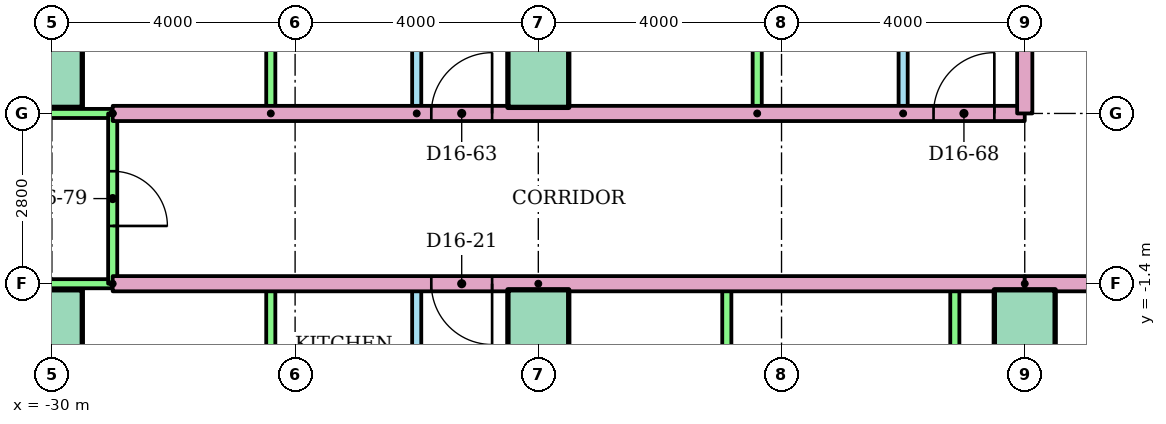
"""IFC4 building model, lengths in metres.
Left out: names, types, materials, properties, quantities, classifications, styles, units other than length and angle.
Written with IfcOpenShell. Run it as: python <this file> out.ifc"""

import sys

from ifc_helpers import new_model, si_unit, direction, frame, frame_2d, origin, origin_2d, place, context, subcontext, project, spatial, rectangle, extrude, element, fill, save


model = new_model("IFC4")
c1 = context("Model", 3, precision=1e-05, world=origin(), true_north=direction((0.0, 1.0)))
c2 = subcontext(c1, "Body", "Model", "MODEL_VIEW")
j1 = project(units=[si_unit("LENGTHUNIT", "METRE"), si_unit("PLANEANGLEUNIT", "RADIAN")], contexts=[c1])
p1 = place(None, origin())
s1 = spatial("IfcSite", under=j1, at=p1, CompositionType="ELEMENT")
p2 = place(p1, origin())
s2 = spatial("IfcBuilding", under=s1, at=p2, CompositionType="ELEMENT")
p3 = place(p2, frame((0.0, 0.0, 60.8)))
s3 = spatial("IfcBuildingStorey", under=s2, at=p3, CompositionType="ELEMENT", Elevation=60.8)
for number, where in (
    (1, (-30.0, -2.0, 0.0)),
    (2, (-22.0, -2.0, 0.0)),
    (3, (-14.0, -2.0, 0.0)),
    (4, (-30.0, 2.0, 0.0)),
    (5, (-22.0, 2.0, 0.0)),
):
    element("IfcColumn", number, at=place(p3, frame(where)), inside=s3, PredefinedType="COLUMN", context=c2, shape_type="SweptSolid", body=[
        extrude(rectangle(XDim=1.0, YDim=1.0, at=origin_2d()), origin(), (0.0, 0.0, 1.0), 3.2),
    ])
p4 = place(p3, frame((-24.0, -6.6, 0.0), z_axis=(0.0, 0.0, 1.0), x_axis=(0.0, 1.0, 0.0)))
e6 = element("IfcWall", 6, at=p4, inside=s3, PredefinedType="PARTITIONING", context=c2, shape_type="SweptSolid", body=[
    extrude(rectangle(XDim=5.2, YDim=0.15, at=frame_2d((2.6, 0.0))), origin(), (0.0, 0.0, 1.0), 2.4),
])
p5 = place(p4, frame((2.94, 0.0, 0.0)))
e7 = element("IfcOpeningElement", 7, at=p5, cuts=e6, PredefinedType="OPENING", context=c2, shape_type="SweptSolid", body=[
    extrude(rectangle(XDim=0.9, YDim=2.1, at=frame_2d((0.45, 1.05))), frame((0.0, 0.085, 0.0), z_axis=(0.0, -1.0, 0.0), x_axis=(1.0, 0.0, 0.0)), (0.0, 0.0, 1.0), 0.17),
])
p6 = place(p4, frame((0.825, 0.0, 0.0)))
e8 = element("IfcOpeningElement", 8, at=p6, cuts=e6, PredefinedType="OPENING", context=c2, shape_type="SweptSolid", body=[
    extrude(rectangle(XDim=0.8, YDim=2.1, at=frame_2d((0.4, 1.05))), frame((0.0, 0.085, 0.0), z_axis=(0.0, -1.0, 0.0), x_axis=(1.0, 0.0, 0.0)), (0.0, 0.0, 1.0), 0.17),
])
for number, where, z_axis, x_axis in (
    (9, (-26.4, -6.6, 0.0), (0.0, 0.0, 1.0), (0.0, 1.0, 0.0)),
    (10, (-15.15, -6.6, 0.0), (0.0, 0.0, 1.0), (0.0, 1.0, 0.0)),
    (11, (-18.9, -6.6, 0.0), (0.0, 0.0, 1.0), (0.0, 1.0, 0.0)),
):
    element("IfcWall", number, at=place(p3, frame(where, z_axis=z_axis, x_axis=x_axis)), inside=s3, PredefinedType="PARTITIONING", context=c2, shape_type="SweptSolid", body=[
        extrude(rectangle(XDim=5.2, YDim=0.15, at=frame_2d((2.6, 0.0))), origin(), (0.0, 0.0, 1.0), 2.4),
    ])
p7 = place(p3, frame((-22.0, -1.4, 0.0), z_axis=(0.0, 0.0, 1.0), x_axis=(0.0, -1.0, 0.0)))
e12 = element("IfcWall", 12, at=p7, inside=s3, PredefinedType="PARTITIONING", context=c2, shape_type="SweptSolid", body=[
    extrude(rectangle(XDim=14.71, YDim=0.25, at=frame_2d((7.355, 0.0))), origin(), (0.0, 0.0, 1.0), 2.4),
])
p8 = place(p3, frame((-14.0, -1.4, 0.0), z_axis=(0.0, 0.0, 1.0), x_axis=(-1.0, 0.0, 0.0)))
e13 = element("IfcWall", 13, at=p8, inside=s3, PredefinedType="PARTITIONING", context=c2, shape_type="SweptSolid", body=[
    extrude(rectangle(XDim=15.0, YDim=0.25, at=frame_2d((7.5, 0.0))), origin(), (0.0, 0.0, 1.0), 2.4),
])
p9 = place(p8, frame((8.76, 0.0, 0.0)))
e14 = element("IfcOpeningElement", 14, at=p9, cuts=e13, PredefinedType="OPENING", context=c2, shape_type="SweptSolid", body=[
    extrude(rectangle(XDim=1.0, YDim=2.1, at=frame_2d((0.5, 1.05))), frame((0.0, 0.135, 0.0), z_axis=(0.0, -1.0, 0.0), x_axis=(1.0, 0.0, 0.0)), (0.0, 0.0, 1.0), 0.27),
])
p10 = place(p3, frame((-29.0, -1.4, 0.0), z_axis=(0.0, 0.0, 1.0), x_axis=(-1.0, 0.0, 0.0)))
e15 = element("IfcWall", 15, at=p10, inside=s3, PredefinedType="PARTITIONING", context=c2, shape_type="SweptSolid", body=[
    extrude(rectangle(XDim=7.52, YDim=0.15, at=frame_2d((3.76, 0.0))), origin(), (0.0, 0.0, 1.0), 2.4),
])
p11 = place(p3, frame((-24.0, 1.4, 0.0), z_axis=(0.0, 0.0, 1.0), x_axis=(0.0, 1.0, 0.0)))
e16 = element("IfcWall", 16, at=p11, inside=s3, PredefinedType="PARTITIONING", context=c2, shape_type="SweptSolid", body=[
    extrude(rectangle(XDim=7.6, YDim=0.15, at=frame_2d((3.8, 0.0))), origin(), (0.0, 0.0, 1.0), 2.4),
])
p12 = place(p11, frame((1.675, 0.0, 0.0)))
e17 = element("IfcOpeningElement", 17, at=p12, cuts=e16, PredefinedType="OPENING", context=c2, shape_type="SweptSolid", body=[
    extrude(rectangle(XDim=0.9, YDim=2.1, at=frame_2d((0.45, 1.05))), frame((0.0, 0.085, 0.0), z_axis=(0.0, -1.0, 0.0), x_axis=(1.0, 0.0, 0.0)), (0.0, 0.0, 1.0), 0.17),
])
p13 = place(p11, frame((5.525, 0.0, 0.0)))
e18 = element("IfcOpeningElement", 18, at=p13, cuts=e16, PredefinedType="OPENING", context=c2, shape_type="SweptSolid", body=[
    extrude(rectangle(XDim=0.8, YDim=2.1, at=frame_2d((0.4, 1.05))), frame((0.0, 0.085, 0.0), z_axis=(0.0, -1.0, 0.0), x_axis=(1.0, 0.0, 0.0)), (0.0, 0.0, 1.0), 0.17),
])
p14 = place(p3, frame((-26.4, 1.4, 0.0), z_axis=(0.0, 0.0, 1.0), x_axis=(0.0, 1.0, 0.0)))
e19 = element("IfcWall", 19, at=p14, inside=s3, PredefinedType="PARTITIONING", context=c2, shape_type="SweptSolid", body=[
    extrude(rectangle(XDim=7.6, YDim=0.15, at=frame_2d((3.8, 0.0))), origin(), (0.0, 0.0, 1.0), 2.4),
])
p15 = place(p3, frame((-16.0, 1.4, 0.0), z_axis=(0.0, 0.0, 1.0), x_axis=(0.0, 1.0, 0.0)))
e20 = element("IfcWall", 20, at=p15, inside=s3, PredefinedType="PARTITIONING", context=c2, shape_type="SweptSolid", body=[
    extrude(rectangle(XDim=7.6, YDim=0.15, at=frame_2d((3.8, 0.0))), origin(), (0.0, 0.0, 1.0), 2.4),
])
p16 = place(p15, frame((1.675, 0.0, 0.0)))
e21 = element("IfcOpeningElement", 21, at=p16, cuts=e20, PredefinedType="OPENING", context=c2, shape_type="SweptSolid", body=[
    extrude(rectangle(XDim=0.9, YDim=2.1, at=frame_2d((0.45, 1.05))), frame((0.0, 0.085, 0.0), z_axis=(0.0, -1.0, 0.0), x_axis=(1.0, 0.0, 0.0)), (0.0, 0.0, 1.0), 0.17),
])
p17 = place(p15, frame((5.525, 0.0, 0.0)))
e22 = element("IfcOpeningElement", 22, at=p17, cuts=e20, PredefinedType="OPENING", context=c2, shape_type="SweptSolid", body=[
    extrude(rectangle(XDim=0.8, YDim=2.1, at=frame_2d((0.4, 1.05))), frame((0.0, 0.085, 0.0), z_axis=(0.0, -1.0, 0.0), x_axis=(1.0, 0.0, 0.0)), (0.0, 0.0, 1.0), 0.17),
])
p18 = place(p3, frame((-18.4, 1.4, 0.0), z_axis=(0.0, 0.0, 1.0), x_axis=(0.0, 1.0, 0.0)))
e23 = element("IfcWall", 23, at=p18, inside=s3, PredefinedType="PARTITIONING", context=c2, shape_type="SweptSolid", body=[
    extrude(rectangle(XDim=7.6, YDim=0.15, at=frame_2d((3.8, 0.0))), origin(), (0.0, 0.0, 1.0), 2.4),
])
p19 = place(p3, frame((-22.0, 18.521, 0.0), z_axis=(0.0, 0.0, 1.0), x_axis=(0.0, -1.0, 0.0)))
e24 = element("IfcWall", 24, at=p19, inside=s3, PredefinedType="PARTITIONING", context=c2, shape_type="SweptSolid", body=[
    extrude(rectangle(XDim=17.121, YDim=0.25, at=frame_2d((8.561, 0.0))), origin(), (0.0, 0.0, 1.0), 2.4),
])
p20 = place(p3, frame((-29.0, 1.4, 0.0)))
e25 = element("IfcWall", 25, at=p20, inside=s3, PredefinedType="PARTITIONING", context=c2, shape_type="SweptSolid", body=[
    extrude(rectangle(XDim=15.0, YDim=0.25, at=frame_2d((7.5, 0.0))), origin(), (0.0, 0.0, 1.0), 2.4),
])
p21 = place(p20, frame((5.24, 0.0, 0.0)))
e26 = element("IfcOpeningElement", 26, at=p21, cuts=e25, PredefinedType="OPENING", context=c2, shape_type="SweptSolid", body=[
    extrude(rectangle(XDim=1.0, YDim=2.1, at=frame_2d((0.5, 1.05))), frame((0.0, 0.135, 0.0), z_axis=(0.0, -1.0, 0.0), x_axis=(1.0, 0.0, 0.0)), (0.0, 0.0, 1.0), 0.27),
])
p22 = place(p20, frame((13.5, 0.0, 0.0)))
e27 = element("IfcOpeningElement", 27, at=p22, cuts=e25, PredefinedType="OPENING", context=c2, shape_type="SweptSolid", body=[
    extrude(rectangle(XDim=1.0, YDim=2.1, at=frame_2d((0.5, 1.05))), frame((0.0, 0.135, 0.0), z_axis=(0.0, -1.0, 0.0), x_axis=(1.0, 0.0, 0.0)), (0.0, 0.0, 1.0), 0.27),
])
p23 = place(p3, frame((-36.52, 1.4, 0.0)))
e28 = element("IfcWall", 28, at=p23, inside=s3, PredefinedType="PARTITIONING", context=c2, shape_type="SweptSolid", body=[
    extrude(rectangle(XDim=7.52, YDim=0.15, at=frame_2d((3.76, 0.0))), origin(), (0.0, 0.0, 1.0), 2.4),
])
p24 = place(p3, frame((-29.0, 1.4, 0.0), z_axis=(0.0, 0.0, 1.0), x_axis=(0.0, -1.0, 0.0)))
e29 = element("IfcWall", 29, at=p24, inside=s3, PredefinedType="PARTITIONING", context=c2, shape_type="SweptSolid", body=[
    extrude(rectangle(XDim=2.8, YDim=0.15, at=frame_2d((1.4, 0.0))), origin(), (0.0, 0.0, 1.0), 2.4),
])
p25 = place(p24, frame((0.95, 0.0, 0.0)))
e30 = element("IfcOpeningElement", 30, at=p25, cuts=e29, PredefinedType="OPENING", context=c2, shape_type="SweptSolid", body=[
    extrude(rectangle(XDim=0.9, YDim=2.1, at=frame_2d((0.45, 1.05))), frame((0.0, 0.085, 0.0), z_axis=(0.0, -1.0, 0.0), x_axis=(1.0, 0.0, 0.0)), (0.0, 0.0, 1.0), 0.17),
])
p26 = place(p3, frame((14.0, -1.4, 0.0), z_axis=(0.0, 0.0, 1.0), x_axis=(-1.0, 0.0, 0.0)))
e31 = element("IfcWall", 31, at=p26, inside=s3, PredefinedType="PARTITIONING", context=c2, shape_type="SweptSolid", body=[
    extrude(rectangle(XDim=28.0, YDim=0.25, at=frame_2d((14.0, 0.0))), origin(), (0.0, 0.0, 1.0), 2.4),
])
p27 = place(p26, frame((20.76, 0.0, 0.0)))
e32 = element("IfcOpeningElement", 32, at=p27, cuts=e31, PredefinedType="OPENING", context=c2, shape_type="SweptSolid", body=[
    extrude(rectangle(XDim=1.0, YDim=2.1, at=frame_2d((0.5, 1.05))), frame((0.0, 0.135, 0.0), z_axis=(0.0, -1.0, 0.0), x_axis=(1.0, 0.0, 0.0)), (0.0, 0.0, 1.0), 0.27),
])
p28 = place(p26, frame((18.24, 0.0, 0.0)))
e33 = element("IfcOpeningElement", 33, at=p28, cuts=e31, PredefinedType="OPENING", context=c2, shape_type="SweptSolid", body=[
    extrude(rectangle(XDim=1.0, YDim=2.1, at=frame_2d((0.5, 1.05))), frame((0.0, 0.135, 0.0), z_axis=(0.0, -1.0, 0.0), x_axis=(1.0, 0.0, 0.0)), (0.0, 0.0, 1.0), 0.27),
])
p29 = place(p26, frame((2.24, 0.0, 0.0)))
e34 = element("IfcOpeningElement", 34, at=p29, cuts=e31, PredefinedType="OPENING", context=c2, shape_type="SweptSolid", body=[
    extrude(rectangle(XDim=1.0, YDim=2.1, at=frame_2d((0.5, 1.05))), frame((0.0, 0.135, 0.0), z_axis=(0.0, -1.0, 0.0), x_axis=(1.0, 0.0, 0.0)), (0.0, 0.0, 1.0), 0.27),
])
p30 = place(p3, frame((-14.0, 3.0, 0.0), z_axis=(0.0, 0.0, 1.0), x_axis=(0.0, -1.0, 0.0)))
e35 = element("IfcWall", 35, at=p30, inside=s3, PredefinedType="PARTITIONING", context=c2, shape_type="SweptSolid", body=[
    extrude(rectangle(XDim=1.6, YDim=0.25, at=frame_2d((0.8, 0.0))), origin(), (0.0, 0.0, 1.0), 2.4),
])
p31 = place(p9, origin())
e36 = element("IfcDoor", 36, at=p31, inside=s3, OperationType="SINGLE_SWING_LEFT", PredefinedType="DOOR", context=c2, shape_type="SweptSolid", body=[
    extrude(rectangle(XDim=1.0, YDim=2.1, at=frame_2d((0.5, 1.05))), frame((0.0, 0.025, 0.0), z_axis=(0.0, -1.0, 0.0), x_axis=(1.0, 0.0, 0.0)), (0.0, 0.0, 1.0), 0.05),
])
fill(e14, e36)
p32 = place(p21, origin())
e37 = element("IfcDoor", 37, at=p32, inside=s3, OperationType="SINGLE_SWING_RIGHT", PredefinedType="DOOR", context=c2, shape_type="SweptSolid", body=[
    extrude(rectangle(XDim=1.0, YDim=2.1, at=frame_2d((0.5, 1.05))), frame((0.0, 0.025, 0.0), z_axis=(0.0, -1.0, 0.0), x_axis=(1.0, 0.0, 0.0)), (0.0, 0.0, 1.0), 0.05),
])
fill(e26, e37)
p33 = place(p22, origin())
e38 = element("IfcDoor", 38, at=p33, inside=s3, OperationType="SINGLE_SWING_RIGHT", PredefinedType="DOOR", context=c2, shape_type="SweptSolid", body=[
    extrude(rectangle(XDim=1.0, YDim=2.1, at=frame_2d((0.5, 1.05))), frame((0.0, 0.025, 0.0), z_axis=(0.0, -1.0, 0.0), x_axis=(1.0, 0.0, 0.0)), (0.0, 0.0, 1.0), 0.05),
])
fill(e27, e38)
p34 = place(p25, origin())
e39 = element("IfcDoor", 39, at=p34, inside=s3, OperationType="SINGLE_SWING_RIGHT", PredefinedType="DOOR", context=c2, shape_type="SweptSolid", body=[
    extrude(rectangle(XDim=0.9, YDim=2.1, at=frame_2d((0.45, 1.05))), frame((0.0, 0.025, 0.0), z_axis=(0.0, -1.0, 0.0), x_axis=(1.0, 0.0, 0.0)), (0.0, 0.0, 1.0), 0.05),
])
fill(e30, e39)
save(model, sys.argv[1])
